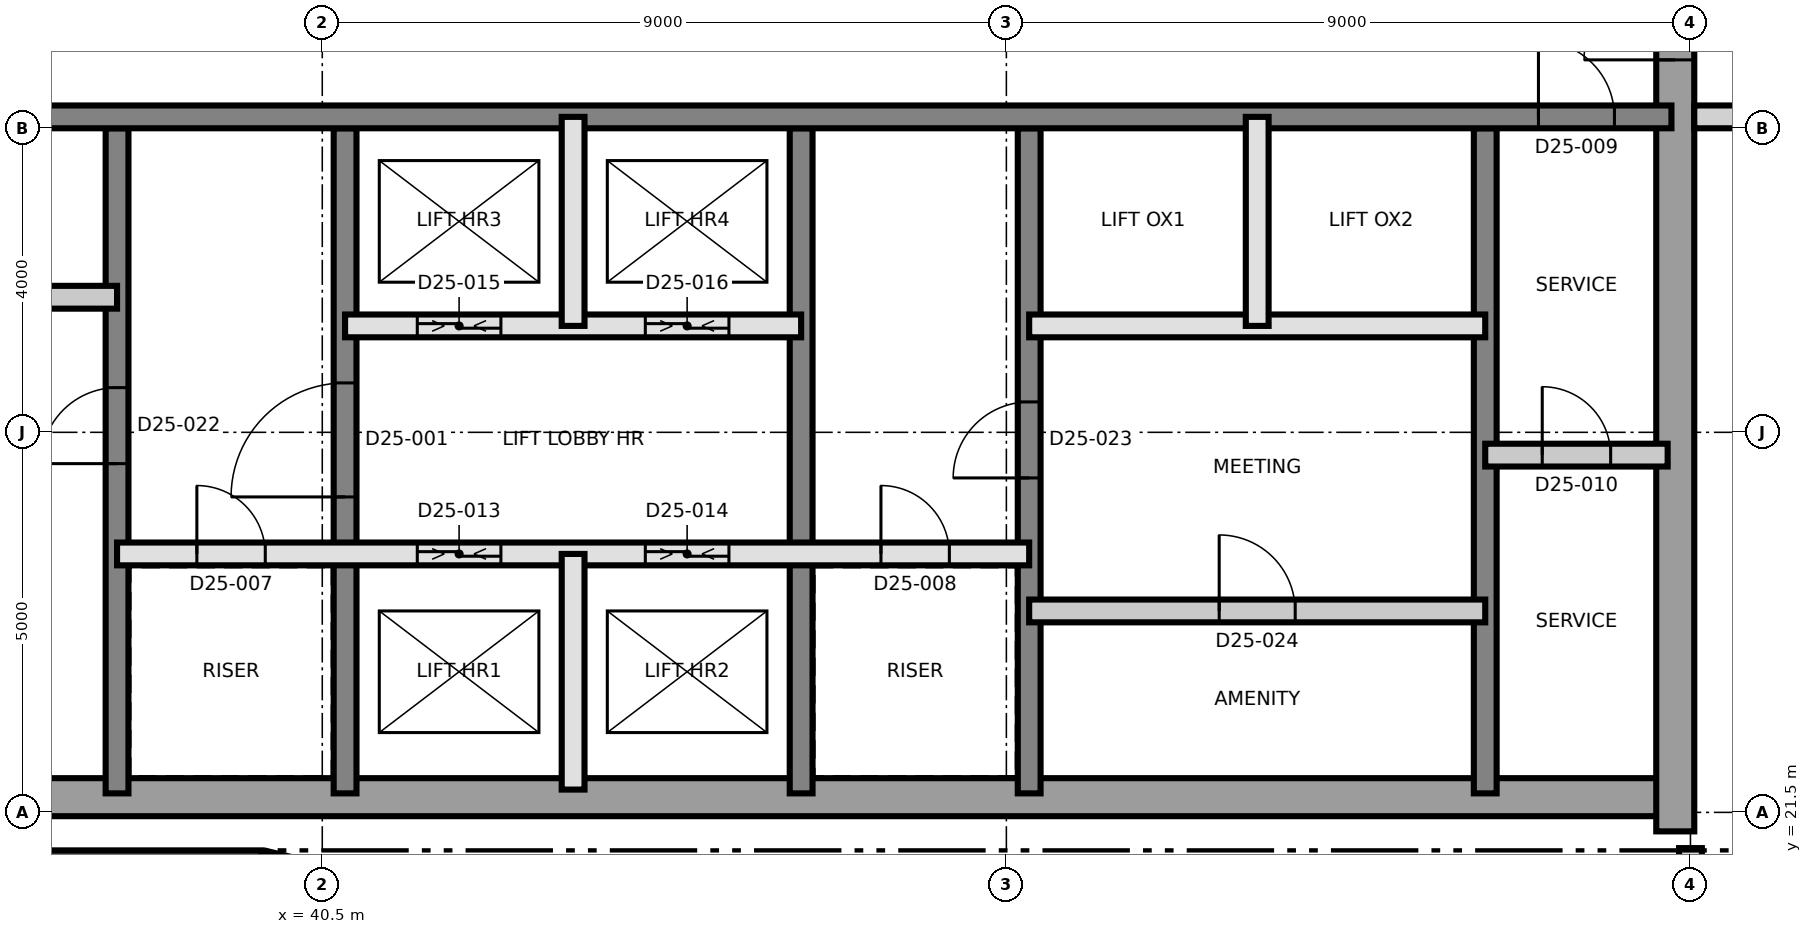
"""IFC4 building model, lengths in metres.
Left out: names, types, materials, properties, quantities, classifications, styles, units other than length and angle.
Written with IfcOpenShell. Run it as: python <this file> out.ifc"""

import sys

from ifc_helpers import new_model, si_unit, direction, frame, frame_2d, origin, place, context, subcontext, project, spatial, rectangle, extrude, element, fill, save


model = new_model("IFC4")
c1 = context("Model", 3, precision=1e-05, world=origin(), true_north=direction((0.0, 1.0)))
c2 = subcontext(c1, "Body", "Model", "MODEL_VIEW")
j1 = project(units=[si_unit("LENGTHUNIT", "METRE"), si_unit("PLANEANGLEUNIT", "RADIAN")], contexts=[c1])
p1 = place(None, origin())
s1 = spatial("IfcSite", under=j1, at=p1, CompositionType="ELEMENT")
p2 = place(p1, origin())
s2 = spatial("IfcBuilding", under=s1, at=p2, CompositionType="ELEMENT")
p3 = place(p2, frame((0.0, 0.0, 225.4)))
s3 = spatial("IfcBuildingStorey", under=s2, at=p3, CompositionType="ELEMENT", Elevation=225.4)
p4 = place(p3, frame((31.25, 21.7, 0.0), z_axis=(0.0, 0.0, 1.0), x_axis=(1.0, 0.0, 0.0)))
e1 = element("IfcWall", 1, at=p4, inside=s3, PredefinedType="SHEAR", context=c2, shape_type="SweptSolid", body=[
    extrude(rectangle(XDim=27.0, YDim=0.5, at=frame_2d((13.5, 0.0))), origin(), (0.0, 0.0, 1.0), 3.7),
])
p5 = place(p3, frame((58.3, 21.25, 0.0), z_axis=(0.0, 0.0, 1.0), x_axis=(0.0, 1.0, 0.0)))
e2 = element("IfcWall", 2, at=p5, inside=s3, PredefinedType="SHEAR", context=c2, shape_type="SweptSolid", body=[
    extrude(rectangle(XDim=18.5, YDim=0.5, at=frame_2d((9.25, 0.0))), origin(), (0.0, 0.0, 1.0), 3.7),
])
p6 = place(p5, frame((10.15, 0.0, 0.0)))
e3 = element("IfcOpeningElement", 3, at=p6, cuts=e2, PredefinedType="OPENING", context=c2, shape_type="SweptSolid", body=[
    extrude(rectangle(XDim=1.2, YDim=2.1, at=frame_2d((0.6, 1.05))), frame((0.0, 0.26, 0.0), z_axis=(0.0, -1.0, 0.0), x_axis=(1.0, 0.0, 0.0)), (0.0, 0.0, 1.0), 0.52),
])
p7 = place(p3, frame((37.8, 21.75, 0.0), z_axis=(0.0, 0.0, 1.0), x_axis=(0.0, 1.0, 0.0)))
e4 = element("IfcWall", 4, at=p7, inside=s3, PredefinedType="SHEAR", context=c2, shape_type="SweptSolid", body=[
    extrude(rectangle(XDim=8.75, YDim=0.3, at=frame_2d((4.375, 0.0))), origin(), (0.0, 0.0, 1.0), 3.7),
])
p8 = place(p7, frame((4.338, 0.0, 0.0)))
e5 = element("IfcOpeningElement", 5, at=p8, cuts=e4, PredefinedType="OPENING", context=c2, shape_type="SweptSolid", body=[
    extrude(rectangle(XDim=1.0, YDim=2.1, at=frame_2d((0.5, 1.05))), frame((0.0, 0.16, 0.0), z_axis=(0.0, -1.0, 0.0), x_axis=(1.0, 0.0, 0.0)), (0.0, 0.0, 1.0), 0.32),
])
p9 = place(p3, frame((40.8, 21.75, 0.0), z_axis=(0.0, 0.0, 1.0), x_axis=(0.0, 1.0, 0.0)))
e6 = element("IfcWall", 6, at=p9, inside=s3, PredefinedType="SHEAR", context=c2, shape_type="SweptSolid", body=[
    extrude(rectangle(XDim=8.75, YDim=0.3, at=frame_2d((4.375, 0.0))), origin(), (0.0, 0.0, 1.0), 3.7),
])
p10 = place(p9, frame((3.9, 0.0, 0.0)))
e7 = element("IfcOpeningElement", 7, at=p10, cuts=e6, PredefinedType="OPENING", context=c2, shape_type="SweptSolid", body=[
    extrude(rectangle(XDim=1.5, YDim=2.1, at=frame_2d((0.75, 1.05))), frame((0.0, 0.16, 0.0), z_axis=(0.0, -1.0, 0.0), x_axis=(1.0, 0.0, 0.0)), (0.0, 0.0, 1.0), 0.32),
])
p11 = place(p3, frame((46.8, 21.75, 0.0), z_axis=(0.0, 0.0, 1.0), x_axis=(0.0, 1.0, 0.0)))
e8 = element("IfcWall", 8, at=p11, inside=s3, PredefinedType="SHEAR", context=c2, shape_type="SweptSolid", body=[
    extrude(rectangle(XDim=8.75, YDim=0.3, at=frame_2d((4.375, 0.0))), origin(), (0.0, 0.0, 1.0), 3.7),
])
p12 = place(p3, frame((49.8, 21.75, 0.0), z_axis=(0.0, 0.0, 1.0), x_axis=(0.0, 1.0, 0.0)))
e9 = element("IfcWall", 9, at=p12, inside=s3, PredefinedType="SHEAR", context=c2, shape_type="SweptSolid", body=[
    extrude(rectangle(XDim=8.75, YDim=0.3, at=frame_2d((4.375, 0.0))), origin(), (0.0, 0.0, 1.0), 3.7),
])
p13 = place(p12, frame((4.15, 0.0, 0.0)))
e10 = element("IfcOpeningElement", 10, at=p13, cuts=e9, PredefinedType="OPENING", context=c2, shape_type="SweptSolid", body=[
    extrude(rectangle(XDim=1.0, YDim=2.1, at=frame_2d((0.5, 1.05))), frame((0.0, 0.16, 0.0), z_axis=(0.0, -1.0, 0.0), x_axis=(1.0, 0.0, 0.0)), (0.0, 0.0, 1.0), 0.32),
])
p14 = place(p3, frame((55.8, 21.75, 0.0), z_axis=(0.0, 0.0, 1.0), x_axis=(0.0, 1.0, 0.0)))
e11 = element("IfcWall", 11, at=p14, inside=s3, PredefinedType="SHEAR", context=c2, shape_type="SweptSolid", body=[
    extrude(rectangle(XDim=8.75, YDim=0.3, at=frame_2d((4.375, 0.0))), origin(), (0.0, 0.0, 1.0), 3.7),
])
p15 = place(p3, frame((31.75, 30.65, 0.0), z_axis=(0.0, 0.0, 1.0), x_axis=(1.0, 0.0, 0.0)))
e12 = element("IfcWall", 12, at=p15, inside=s3, PredefinedType="SHEAR", context=c2, shape_type="SweptSolid", body=[
    extrude(rectangle(XDim=26.5, YDim=0.3, at=frame_2d((13.25, 0.0))), origin(), (0.0, 0.0, 1.0), 3.7),
])
p16 = place(p15, frame((24.75, 0.0, 0.0)))
e13 = element("IfcOpeningElement", 13, at=p16, cuts=e12, PredefinedType="OPENING", context=c2, shape_type="SweptSolid", body=[
    extrude(rectangle(XDim=1.0, YDim=2.1, at=frame_2d((0.5, 1.05))), frame((0.0, 0.16, 0.0), z_axis=(0.0, -1.0, 0.0), x_axis=(1.0, 0.0, 0.0)), (0.0, 0.0, 1.0), 0.32),
])
p17 = place(p15, frame((4.05, 0.0, 0.0)))
e14 = element("IfcOpeningElement", 14, at=p17, cuts=e12, PredefinedType="OPENING", context=c2, shape_type="SweptSolid", body=[
    extrude(rectangle(XDim=1.0, YDim=2.1, at=frame_2d((0.5, 1.05))), frame((0.0, 0.16, 0.0), z_axis=(0.0, -1.0, 0.0), x_axis=(1.0, 0.0, 0.0)), (0.0, 0.0, 1.0), 0.32),
])
p18 = place(p3, frame((31.36, 20.85, 0.0), z_axis=(0.0, 0.0, 1.0), x_axis=(1.0, 0.0, 0.0)))
e15 = element("IfcWall", 15, at=p18, inside=s3, PredefinedType="SOLIDWALL", context=c2, shape_type="SweptSolid", body=[
    extrude(rectangle(XDim=8.34, YDim=0.3, at=frame_2d((4.17, 0.0))), origin(), (0.0, 0.0, 1.0), 3.4),
])
p19 = place(p3, frame((39.735, 20.846, 0.0), z_axis=(0.0, 0.0, 1.0), x_axis=(0.97206095595, -0.234728562212, 0.0)))
e16 = element("IfcWall", 16, at=p19, inside=s3, PredefinedType="SOLIDWALL", context=c2, shape_type="SweptSolid", body=[
    extrude(rectangle(XDim=2.35, YDim=0.3, at=frame_2d((1.175, 0.0))), origin(), (0.0, 0.0, 1.0), 3.4),
])
p20 = place(p3, frame((49.8, 24.15, 0.0), z_axis=(0.0, 0.0, 1.0), x_axis=(1.0, 0.0, 0.0)))
e17 = element("IfcWall", 17, at=p20, inside=s3, PredefinedType="PARTITIONING", context=c2, shape_type="SweptSolid", body=[
    extrude(rectangle(XDim=6.0, YDim=0.3, at=frame_2d((3.0, 0.0))), origin(), (0.0, 0.0, 1.0), 3.4),
])
p21 = place(p20, frame((2.5, 0.0, 0.0)))
e18 = element("IfcOpeningElement", 18, at=p21, cuts=e17, PredefinedType="OPENING", context=c2, shape_type="SweptSolid", body=[
    extrude(rectangle(XDim=1.0, YDim=2.1, at=frame_2d((0.5, 1.05))), frame((0.0, 0.16, 0.0), z_axis=(0.0, -1.0, 0.0), x_axis=(1.0, 0.0, 0.0)), (0.0, 0.0, 1.0), 0.32),
])
p22 = place(p3, frame((37.8, 24.9, 0.0), z_axis=(0.0, 0.0, 1.0), x_axis=(1.0, 0.0, 0.0)))
e19 = element("IfcWall", 19, at=p22, inside=s3, PredefinedType="SOLIDWALL", context=c2, shape_type="SweptSolid", body=[
    extrude(rectangle(XDim=12.0, YDim=0.3, at=frame_2d((6.0, 0.0))), origin(), (0.0, 0.0, 1.0), 3.4),
])
p23 = place(p22, frame((1.05, 0.0, 0.0)))
e20 = element("IfcOpeningElement", 20, at=p23, cuts=e19, PredefinedType="OPENING", context=c2, shape_type="SweptSolid", body=[
    extrude(rectangle(XDim=0.9, YDim=2.1, at=frame_2d((0.45, 1.05))), frame((0.0, 0.16, 0.0), z_axis=(0.0, -1.0, 0.0), x_axis=(1.0, 0.0, 0.0)), (0.0, 0.0, 1.0), 0.32),
])
p24 = place(p22, frame((10.05, 0.0, 0.0)))
e21 = element("IfcOpeningElement", 21, at=p24, cuts=e19, PredefinedType="OPENING", context=c2, shape_type="SweptSolid", body=[
    extrude(rectangle(XDim=0.9, YDim=2.1, at=frame_2d((0.45, 1.05))), frame((0.0, 0.16, 0.0), z_axis=(0.0, -1.0, 0.0), x_axis=(1.0, 0.0, 0.0)), (0.0, 0.0, 1.0), 0.32),
])
p25 = place(p22, frame((3.95, 0.0, 0.0)))
e22 = element("IfcOpeningElement", 22, at=p25, cuts=e19, PredefinedType="OPENING", context=c2, shape_type="SweptSolid", body=[
    extrude(rectangle(XDim=1.1, YDim=2.4, at=frame_2d((0.55, 1.2))), frame((0.0, 0.16, 0.0), z_axis=(0.0, -1.0, 0.0), x_axis=(1.0, 0.0, 0.0)), (0.0, 0.0, 1.0), 0.32),
])
p26 = place(p22, frame((6.95, 0.0, 0.0)))
e23 = element("IfcOpeningElement", 23, at=p26, cuts=e19, PredefinedType="OPENING", context=c2, shape_type="SweptSolid", body=[
    extrude(rectangle(XDim=1.1, YDim=2.4, at=frame_2d((0.55, 1.2))), frame((0.0, 0.16, 0.0), z_axis=(0.0, -1.0, 0.0), x_axis=(1.0, 0.0, 0.0)), (0.0, 0.0, 1.0), 0.32),
])
p27 = place(p3, frame((55.8, 26.2, 0.0), z_axis=(0.0, 0.0, 1.0), x_axis=(1.0, 0.0, 0.0)))
e24 = element("IfcWall", 24, at=p27, inside=s3, PredefinedType="PARTITIONING", context=c2, shape_type="SweptSolid", body=[
    extrude(rectangle(XDim=2.4, YDim=0.3, at=frame_2d((1.2, 0.0))), origin(), (0.0, 0.0, 1.0), 3.4),
])
p28 = place(p27, frame((0.75, 0.0, 0.0)))
e25 = element("IfcOpeningElement", 25, at=p28, cuts=e24, PredefinedType="OPENING", context=c2, shape_type="SweptSolid", body=[
    extrude(rectangle(XDim=0.9, YDim=2.1, at=frame_2d((0.45, 1.05))), frame((0.0, 0.16, 0.0), z_axis=(0.0, -1.0, 0.0), x_axis=(1.0, 0.0, 0.0)), (0.0, 0.0, 1.0), 0.32),
])
p29 = place(p3, frame((40.8, 27.9, 0.0), z_axis=(0.0, 0.0, 1.0), x_axis=(1.0, 0.0, 0.0)))
e26 = element("IfcWall", 26, at=p29, inside=s3, PredefinedType="SOLIDWALL", context=c2, shape_type="SweptSolid", body=[
    extrude(rectangle(XDim=6.0, YDim=0.3, at=frame_2d((3.0, 0.0))), origin(), (0.0, 0.0, 1.0), 3.4),
])
p30 = place(p29, frame((0.95, 0.0, 0.0)))
e27 = element("IfcOpeningElement", 27, at=p30, cuts=e26, PredefinedType="OPENING", context=c2, shape_type="SweptSolid", body=[
    extrude(rectangle(XDim=1.1, YDim=2.4, at=frame_2d((0.55, 1.2))), frame((0.0, 0.16, 0.0), z_axis=(0.0, -1.0, 0.0), x_axis=(1.0, 0.0, 0.0)), (0.0, 0.0, 1.0), 0.32),
])
p31 = place(p29, frame((3.95, 0.0, 0.0)))
e28 = element("IfcOpeningElement", 28, at=p31, cuts=e26, PredefinedType="OPENING", context=c2, shape_type="SweptSolid", body=[
    extrude(rectangle(XDim=1.1, YDim=2.4, at=frame_2d((0.55, 1.2))), frame((0.0, 0.16, 0.0), z_axis=(0.0, -1.0, 0.0), x_axis=(1.0, 0.0, 0.0)), (0.0, 0.0, 1.0), 0.32),
])
p32 = place(p3, frame((49.8, 27.9, 0.0), z_axis=(0.0, 0.0, 1.0), x_axis=(1.0, 0.0, 0.0)))
e29 = element("IfcWall", 29, at=p32, inside=s3, PredefinedType="SOLIDWALL", context=c2, shape_type="SweptSolid", body=[
    extrude(rectangle(XDim=6.0, YDim=0.3, at=frame_2d((3.0, 0.0))), origin(), (0.0, 0.0, 1.0), 3.4),
])
p33 = place(p3, frame((31.8, 28.277, 0.0), z_axis=(0.0, 0.0, 1.0), x_axis=(1.0, 0.0, 0.0)))
e30 = element("IfcWall", 30, at=p33, inside=s3, PredefinedType="PARTITIONING", context=c2, shape_type="SweptSolid", body=[
    extrude(rectangle(XDim=6.0, YDim=0.3, at=frame_2d((3.0, 0.0))), origin(), (0.0, 0.0, 1.0), 3.4),
])
p34 = place(p3, frame((43.8, 21.8, 0.0), z_axis=(0.0, 0.0, 1.0), x_axis=(0.0, 1.0, 0.0)))
e31 = element("IfcWall", 31, at=p34, inside=s3, PredefinedType="SOLIDWALL", context=c2, shape_type="SweptSolid", body=[
    extrude(rectangle(XDim=3.1, YDim=0.3, at=frame_2d((1.55, 0.0))), origin(), (0.0, 0.0, 1.0), 3.4),
])
for number, where, z_axis, x_axis in (
    (32, (43.8, 27.9, 0.0), (0.0, 0.0, 1.0), (0.0, 1.0, 0.0)),
    (33, (52.8, 27.9, 0.0), (0.0, 0.0, 1.0), (0.0, 1.0, 0.0)),
):
    element("IfcWall", number, at=place(p3, frame(where, z_axis=z_axis, x_axis=x_axis)), inside=s3, PredefinedType="SOLIDWALL", context=c2, shape_type="SweptSolid", body=[
        extrude(rectangle(XDim=2.75, YDim=0.3, at=frame_2d((1.375, 0.0))), origin(), (0.0, 0.0, 1.0), 3.4),
    ])
p35 = place(p3, frame((58.55, 30.65, 0.0), z_axis=(0.0, 0.0, 1.0), x_axis=(1.0, 0.0, 0.0)))
e34 = element("IfcWall", 34, at=p35, inside=s3, PredefinedType="PARTITIONING", context=c2, shape_type="SweptSolid", body=[
    extrude(rectangle(XDim=26.78, YDim=0.3, at=frame_2d((13.39, 0.0))), origin(), (0.0, 0.0, 1.0), 3.4),
])
p36 = place(p35, frame((1.65, 0.0, 0.0)))
e35 = element("IfcOpeningElement", 35, at=p36, cuts=e34, PredefinedType="OPENING", context=c2, shape_type="SweptSolid", body=[
    extrude(rectangle(XDim=1.2, YDim=2.1, at=frame_2d((0.6, 1.05))), frame((0.0, 0.16, 0.0), z_axis=(0.0, -1.0, 0.0), x_axis=(1.0, 0.0, 0.0)), (0.0, 0.0, 1.0), 0.32),
])
p37 = place(p35, frame((4.9, 0.0, 0.0)))
e36 = element("IfcOpeningElement", 36, at=p37, cuts=e34, PredefinedType="OPENING", context=c2, shape_type="SweptSolid", body=[
    extrude(rectangle(XDim=1.0, YDim=2.1, at=frame_2d((0.5, 1.05))), frame((0.0, 0.16, 0.0), z_axis=(0.0, -1.0, 0.0), x_axis=(1.0, 0.0, 0.0)), (0.0, 0.0, 1.0), 0.32),
])
p38 = place(p35, frame((12.95, 0.0, 0.0)))
e37 = element("IfcOpeningElement", 37, at=p38, cuts=e34, PredefinedType="OPENING", context=c2, shape_type="SweptSolid", body=[
    extrude(rectangle(XDim=1.0, YDim=2.4, at=frame_2d((0.5, 1.2))), frame((0.0, 0.16, 0.0), z_axis=(0.0, -1.0, 0.0), x_axis=(1.0, 0.0, 0.0)), (0.0, 0.0, 1.0), 0.32),
])
p39 = place(p35, frame((19.085, 0.0, 0.0)))
e38 = element("IfcOpeningElement", 38, at=p39, cuts=e34, PredefinedType="OPENING", context=c2, shape_type="SweptSolid", body=[
    extrude(rectangle(XDim=1.2, YDim=2.1, at=frame_2d((0.6, 1.05))), frame((0.0, 0.16, 0.0), z_axis=(0.0, -1.0, 0.0), x_axis=(1.0, 0.0, 0.0)), (0.0, 0.0, 1.0), 0.32),
])
p40 = place(p35, frame((22.335, 0.0, 0.0)))
e39 = element("IfcOpeningElement", 39, at=p40, cuts=e34, PredefinedType="OPENING", context=c2, shape_type="SweptSolid", body=[
    extrude(rectangle(XDim=1.0, YDim=2.1, at=frame_2d((0.5, 1.05))), frame((0.0, 0.16, 0.0), z_axis=(0.0, -1.0, 0.0), x_axis=(1.0, 0.0, 0.0)), (0.0, 0.0, 1.0), 0.32),
])
p41 = place(p3, frame((58.5, 20.35, 0.0), z_axis=(0.0, 0.0, 1.0), x_axis=(0.0, 1.0, 0.0)))
e40 = element("IfcWall", 40, at=p41, inside=s3, PredefinedType="PARTITIONING", context=c2, shape_type="SweptSolid", body=[
    extrude(rectangle(XDim=0.68, YDim=0.3, at=frame_2d((0.34, 0.0))), origin(), (0.0, 0.0, 1.0), 3.4),
])
p42 = place(p10, origin())
e41 = element("IfcDoor", 41, at=p42, inside=s3, OperationType="SINGLE_SWING_RIGHT", PredefinedType="DOOR", context=c2, shape_type="SweptSolid", body=[
    extrude(rectangle(XDim=1.5, YDim=2.1, at=frame_2d((0.75, 1.05))), frame((0.0, 0.025, 0.0), z_axis=(0.0, -1.0, 0.0), x_axis=(1.0, 0.0, 0.0)), (0.0, 0.0, 1.0), 0.05),
])
fill(e7, e41)
p43 = place(p23, origin())
e42 = element("IfcDoor", 42, at=p43, inside=s3, OperationType="SINGLE_SWING_LEFT", PredefinedType="DOOR", context=c2, shape_type="SweptSolid", body=[
    extrude(rectangle(XDim=0.9, YDim=2.1, at=frame_2d((0.45, 1.05))), frame((0.0, 0.025, 0.0), z_axis=(0.0, -1.0, 0.0), x_axis=(1.0, 0.0, 0.0)), (0.0, 0.0, 1.0), 0.05),
])
fill(e20, e42)
p44 = place(p24, origin())
e43 = element("IfcDoor", 43, at=p44, inside=s3, OperationType="SINGLE_SWING_RIGHT", PredefinedType="DOOR", context=c2, shape_type="SweptSolid", body=[
    extrude(rectangle(XDim=0.9, YDim=2.1, at=frame_2d((0.45, 1.05))), frame((0.0, 0.025, 0.0), z_axis=(0.0, -1.0, 0.0), x_axis=(1.0, 0.0, 0.0)), (0.0, 0.0, 1.0), 0.05),
])
fill(e21, e43)
p45 = place(p16, origin())
e44 = element("IfcDoor", 44, at=p45, inside=s3, OperationType="SINGLE_SWING_LEFT", PredefinedType="DOOR", context=c2, shape_type="SweptSolid", body=[
    extrude(rectangle(XDim=1.0, YDim=2.1, at=frame_2d((0.5, 1.05))), frame((0.0, 0.025, 0.0), z_axis=(0.0, -1.0, 0.0), x_axis=(1.0, 0.0, 0.0)), (0.0, 0.0, 1.0), 0.05),
])
fill(e13, e44)
p46 = place(p28, origin())
e45 = element("IfcDoor", 45, at=p46, inside=s3, OperationType="SINGLE_SWING_RIGHT", PredefinedType="DOOR", context=c2, shape_type="SweptSolid", body=[
    extrude(rectangle(XDim=0.9, YDim=2.1, at=frame_2d((0.45, 1.05))), frame((0.0, 0.025, 0.0), z_axis=(0.0, -1.0, 0.0), x_axis=(1.0, 0.0, 0.0)), (0.0, 0.0, 1.0), 0.05),
])
fill(e25, e45)
p47 = place(p6, origin())
e46 = element("IfcDoor", 46, at=p47, inside=s3, OperationType="SINGLE_SWING_LEFT", PredefinedType="DOOR", context=c2, shape_type="SweptSolid", body=[
    extrude(rectangle(XDim=1.2, YDim=2.1, at=frame_2d((0.6, 1.05))), frame((0.0, 0.025, 0.0), z_axis=(0.0, -1.0, 0.0), x_axis=(1.0, 0.0, 0.0)), (0.0, 0.0, 1.0), 0.05),
])
fill(e3, e46)
p48 = place(p25, origin())
e47 = element("IfcDoor", 47, at=p48, inside=s3, OperationType="SLIDING_TO_LEFT", PredefinedType="DOOR", context=c2, shape_type="SweptSolid", body=[
    extrude(rectangle(XDim=1.1, YDim=2.4, at=frame_2d((0.55, 1.2))), frame((0.0, 0.025, 0.0), z_axis=(0.0, -1.0, 0.0), x_axis=(1.0, 0.0, 0.0)), (0.0, 0.0, 1.0), 0.05),
])
fill(e22, e47)
p49 = place(p26, origin())
e48 = element("IfcDoor", 48, at=p49, inside=s3, OperationType="SLIDING_TO_LEFT", PredefinedType="DOOR", context=c2, shape_type="SweptSolid", body=[
    extrude(rectangle(XDim=1.1, YDim=2.4, at=frame_2d((0.55, 1.2))), frame((0.0, 0.025, 0.0), z_axis=(0.0, -1.0, 0.0), x_axis=(1.0, 0.0, 0.0)), (0.0, 0.0, 1.0), 0.05),
])
fill(e23, e48)
p50 = place(p30, origin())
e49 = element("IfcDoor", 49, at=p50, inside=s3, OperationType="SLIDING_TO_LEFT", PredefinedType="DOOR", context=c2, shape_type="SweptSolid", body=[
    extrude(rectangle(XDim=1.1, YDim=2.4, at=frame_2d((0.55, 1.2))), frame((0.0, 0.025, 0.0), z_axis=(0.0, -1.0, 0.0), x_axis=(1.0, 0.0, 0.0)), (0.0, 0.0, 1.0), 0.05),
])
fill(e27, e49)
p51 = place(p31, origin())
e50 = element("IfcDoor", 50, at=p51, inside=s3, OperationType="SLIDING_TO_LEFT", PredefinedType="DOOR", context=c2, shape_type="SweptSolid", body=[
    extrude(rectangle(XDim=1.1, YDim=2.4, at=frame_2d((0.55, 1.2))), frame((0.0, 0.025, 0.0), z_axis=(0.0, -1.0, 0.0), x_axis=(1.0, 0.0, 0.0)), (0.0, 0.0, 1.0), 0.05),
])
fill(e28, e50)
p52 = place(p8, origin())
e51 = element("IfcDoor", 51, at=p52, inside=s3, OperationType="SINGLE_SWING_RIGHT", PredefinedType="DOOR", context=c2, shape_type="SweptSolid", body=[
    extrude(rectangle(XDim=1.0, YDim=2.1, at=frame_2d((0.5, 1.05))), frame((0.0, 0.025, 0.0), z_axis=(0.0, -1.0, 0.0), x_axis=(1.0, 0.0, 0.0)), (0.0, 0.0, 1.0), 0.05),
])
fill(e5, e51)
p53 = place(p13, origin())
e52 = element("IfcDoor", 52, at=p53, inside=s3, OperationType="SINGLE_SWING_LEFT", PredefinedType="DOOR", context=c2, shape_type="SweptSolid", body=[
    extrude(rectangle(XDim=1.0, YDim=2.1, at=frame_2d((0.5, 1.05))), frame((0.0, 0.025, 0.0), z_axis=(0.0, -1.0, 0.0), x_axis=(1.0, 0.0, 0.0)), (0.0, 0.0, 1.0), 0.05),
])
fill(e10, e52)
p54 = place(p21, origin())
e53 = element("IfcDoor", 53, at=p54, inside=s3, OperationType="SINGLE_SWING_RIGHT", PredefinedType="DOOR", context=c2, shape_type="SweptSolid", body=[
    extrude(rectangle(XDim=1.0, YDim=2.1, at=frame_2d((0.5, 1.05))), frame((0.0, 0.025, 0.0), z_axis=(0.0, -1.0, 0.0), x_axis=(1.0, 0.0, 0.0)), (0.0, 0.0, 1.0), 0.05),
])
fill(e18, e53)
save(model, sys.argv[1])
